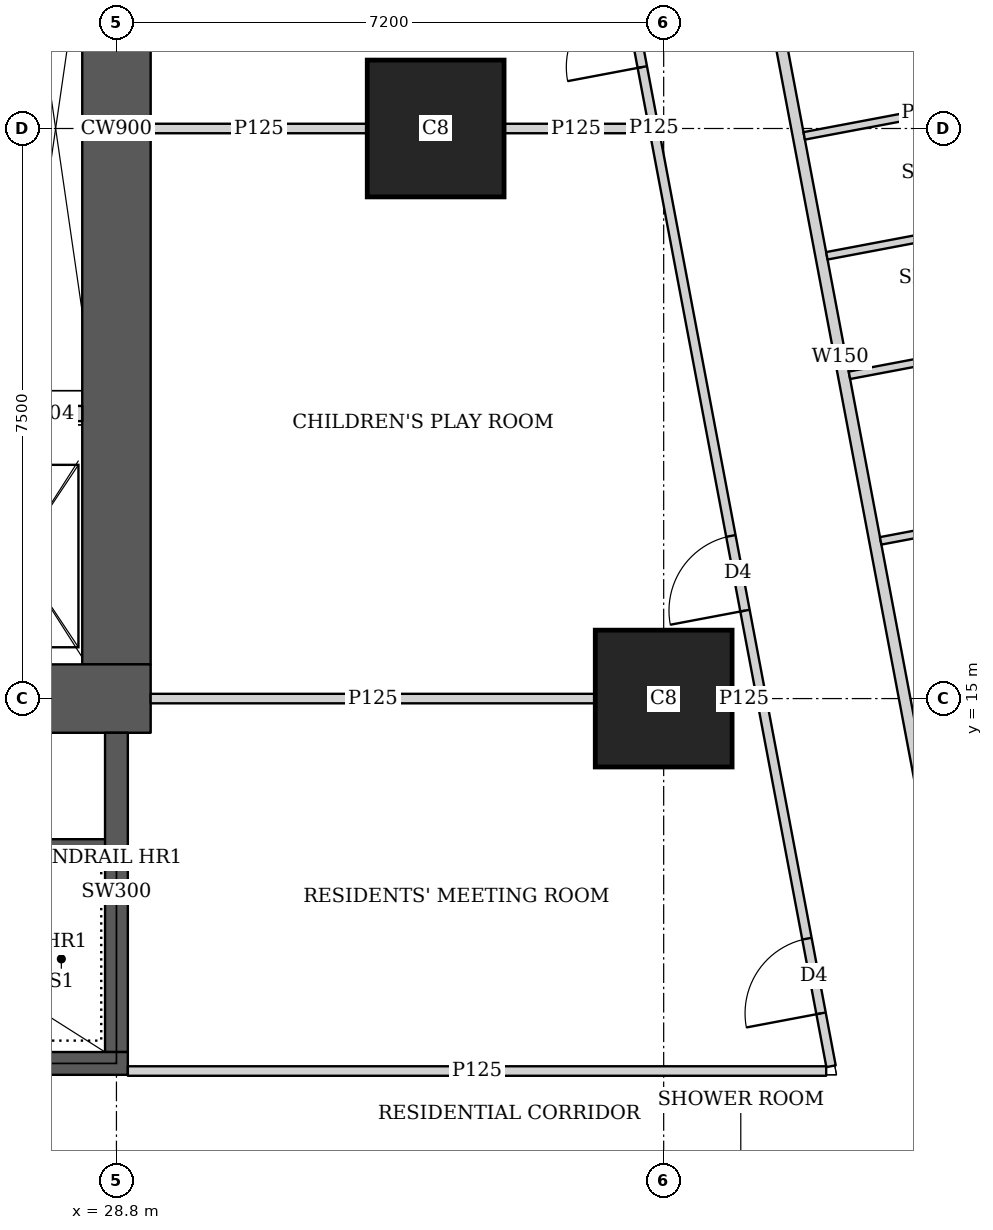
"""IFC4 building model, lengths in metres.
Left out: names, types, materials, properties, quantities, classifications, styles, units other than length and angle.
Written with IfcOpenShell. Run it as: python <this file> out.ifc"""

import sys

from ifc_helpers import new_model, si_unit, direction, frame, frame_2d, origin, origin_2d, place, context, subcontext, project, spatial, rectangle, extrude, element, fill, save


model = new_model("IFC4")
c1 = context("Model", 3, precision=1e-05, world=origin(), true_north=direction((0.0, 1.0)))
c2 = subcontext(c1, "Body", "Model", "MODEL_VIEW")
j1 = project(units=[si_unit("LENGTHUNIT", "METRE"), si_unit("PLANEANGLEUNIT", "RADIAN")], contexts=[c1])
p1 = place(None, origin())
s1 = spatial("IfcSite", under=j1, at=p1, CompositionType="ELEMENT")
p2 = place(p1, origin())
s2 = spatial("IfcBuilding", under=s1, at=p2, CompositionType="ELEMENT")
p3 = place(p2, frame((0.0, 0.0, 31.25)))
s3 = spatial("IfcBuildingStorey", under=s2, at=p3, CompositionType="ELEMENT", Elevation=31.25)
for number, where, z_axis, x_axis in (
    (1, (36.0, 15.0, 0.0), (0.0, 0.0, 1.0), (1.0, 0.0, 0.0)),
    (2, (33.0, 22.5, 0.0), (0.0, 0.0, 1.0), (1.0, 0.0, 0.0)),
):
    element("IfcColumn", number, at=place(p3, frame(where, z_axis=z_axis, x_axis=x_axis)), inside=s3, PredefinedType="COLUMN", context=c2, shape_type="SweptSolid", body=[
        extrude(rectangle(XDim=1.8, YDim=1.8, at=origin_2d()), origin(), (0.0, 0.0, 1.0), 3.75),
    ])
p4 = place(p3, frame((13.95, 15.0, 0.0), z_axis=(0.0, 0.0, 1.0), x_axis=(1.0, 0.0, 0.0)))
e3 = element("IfcWall", 3, at=p4, inside=s3, PredefinedType="SHEAR", context=c2, shape_type="SweptSolid", body=[
    extrude(rectangle(XDim=15.3, YDim=0.9, at=frame_2d((7.65, 0.0))), origin(), (0.0, 0.0, 1.0), 3.75),
])
p5 = place(p4, frame((4.45, 0.0, 0.0)))
e4 = element("IfcOpeningElement", 4, at=p5, cuts=e3, PredefinedType="OPENING", context=c2, shape_type="SweptSolid", body=[
    extrude(rectangle(XDim=1.8, YDim=2.1, at=frame_2d((0.9, 1.05))), frame((0.0, 0.46, 0.0), z_axis=(0.0, -1.0, 0.0), x_axis=(1.0, 0.0, 0.0)), (0.0, 0.0, 1.0), 0.92),
])
p6 = place(p4, frame((10.7, 0.0, 0.0)))
e5 = element("IfcOpeningElement", 5, at=p6, cuts=e3, PredefinedType="OPENING", context=c2, shape_type="SweptSolid", body=[
    extrude(rectangle(XDim=1.1, YDim=2.1, at=frame_2d((0.55, 1.05))), frame((0.0, 0.46, 0.0), z_axis=(0.0, -1.0, 0.0), x_axis=(1.0, 0.0, 0.0)), (0.0, 0.0, 1.0), 0.92),
])
p7 = place(p3, frame((28.8, 15.45, 0.0), z_axis=(0.0, 0.0, 1.0), x_axis=(0.0, 1.0, 0.0)))
e6 = element("IfcWall", 6, at=p7, inside=s3, PredefinedType="SHEAR", context=c2, shape_type="SweptSolid", body=[
    extrude(rectangle(XDim=14.1, YDim=0.9, at=frame_2d((7.05, 0.0))), origin(), (0.0, 0.0, 1.0), 3.75),
])
p8 = place(p3, frame((21.45, 10.2, 0.0), z_axis=(0.0, 0.0, 1.0), x_axis=(1.0, 0.0, 0.0)))
e7 = element("IfcWall", 7, at=p8, inside=s3, PredefinedType="SHEAR", context=c2, shape_type="SweptSolid", body=[
    extrude(rectangle(XDim=7.5, YDim=0.3, at=frame_2d((3.75, 0.0))), origin(), (0.0, 0.0, 1.0), 3.75),
])
p9 = place(p8, frame((0.5, 0.0, 0.0)))
e8 = element("IfcOpeningElement", 8, at=p9, cuts=e7, PredefinedType="OPENING", context=c2, shape_type="SweptSolid", body=[
    extrude(rectangle(XDim=1.1, YDim=2.1, at=frame_2d((0.55, 1.05))), frame((0.0, 0.16, 0.0), z_axis=(0.0, -1.0, 0.0), x_axis=(1.0, 0.0, 0.0)), (0.0, 0.0, 1.0), 0.32),
])
p10 = place(p3, frame((28.8, 10.35, 0.0), z_axis=(0.0, 0.0, 1.0), x_axis=(0.0, 1.0, 0.0)))
e9 = element("IfcWall", 9, at=p10, inside=s3, PredefinedType="SHEAR", context=c2, shape_type="SweptSolid", body=[
    extrude(rectangle(XDim=4.2, YDim=0.3, at=frame_2d((2.1, 0.0))), origin(), (0.0, 0.0, 1.0), 3.75),
])
p11 = place(p3, frame((35.094, 36.585, 0.0), z_axis=(0.0, 0.0, 1.0), x_axis=(0.185588860311, -0.982627485331, 0.0)))
e10 = element("IfcWall", 10, at=p11, inside=s3, PredefinedType="SOLIDWALL", context=c2, shape_type="SweptSolid", body=[
    extrude(rectangle(XDim=34.797, YDim=0.15, at=frame_2d((17.399, 0.0))), origin(), (0.0, 0.0, 1.0), 2.5),
])
p12 = place(p11, frame((6.012, 0.0, 0.0)))
e11 = element("IfcOpeningElement", 11, at=p12, cuts=e10, PredefinedType="OPENING", context=c2, shape_type="SweptSolid", body=[
    extrude(rectangle(XDim=1.0, YDim=2.1, at=frame_2d((0.5, 1.05))), frame((0.0, 0.085, 0.0), z_axis=(0.0, -1.0, 0.0), x_axis=(1.0, 0.0, 0.0)), (0.0, 0.0, 1.0), 0.17),
])
p13 = place(p11, frame((9.828, 0.0, 0.0)))
e12 = element("IfcOpeningElement", 12, at=p13, cuts=e10, PredefinedType="OPENING", context=c2, shape_type="SweptSolid", body=[
    extrude(rectangle(XDim=1.0, YDim=2.1, at=frame_2d((0.5, 1.05))), frame((0.0, 0.085, 0.0), z_axis=(0.0, -1.0, 0.0), x_axis=(1.0, 0.0, 0.0)), (0.0, 0.0, 1.0), 0.17),
])
p14 = place(p11, frame((25.9, 0.0, 0.0)))
e13 = element("IfcOpeningElement", 13, at=p14, cuts=e10, PredefinedType="OPENING", context=c2, shape_type="SweptSolid", body=[
    extrude(rectangle(XDim=1.0, YDim=2.1, at=frame_2d((0.5, 1.05))), frame((0.0, 0.085, 0.0), z_axis=(0.0, -1.0, 0.0), x_axis=(1.0, 0.0, 0.0)), (0.0, 0.0, 1.0), 0.17),
])
for number, where, z_axis, x_axis in (
    (14, (41.365, 21.433, 0.0), (0.0, 0.0, 1.0), (-0.983, -0.186, 0.0)),
    (15, (42.073, 17.683, 0.0), (0.0, 0.0, 1.0), (-0.983, -0.186, 0.0)),
):
    element("IfcWall", number, at=place(p3, frame(where, z_axis=z_axis, x_axis=x_axis)), inside=s3, PredefinedType="PARTITIONING", context=c2, shape_type="SweptSolid", body=[
        extrude(rectangle(XDim=3.275, YDim=0.1, at=frame_2d((1.637, 0.0))), origin(), (0.0, 0.0, 1.0), 3.5),
    ])
p15 = place(p3, frame((41.067, 23.011, 0.0), z_axis=(0.0, 0.0, 1.0), x_axis=(-0.982618057925, -0.185638768151, 0.0)))
e16 = element("IfcWall", 16, at=p15, inside=s3, PredefinedType="PARTITIONING", context=c2, shape_type="SweptSolid", body=[
    extrude(rectangle(XDim=3.275, YDim=0.1, at=frame_2d((1.637, 0.0))), origin(), (0.0, 0.0, 1.0), 2.5),
])
p16 = place(p3, frame((41.662, 19.861, 0.0), z_axis=(0.0, 0.0, 1.0), x_axis=(-0.982607026909, -0.185697147715, 0.0)))
e17 = element("IfcWall", 17, at=p16, inside=s3, PredefinedType="PARTITIONING", context=c2, shape_type="SweptSolid", body=[
    extrude(rectangle(XDim=3.275, YDim=0.1, at=frame_2d((1.637, 0.0))), origin(), (0.0, 0.0, 1.0), 3.5),
])
p17 = place(p3, frame((28.95, 10.1, 0.0), z_axis=(0.0, 0.0, 1.0), x_axis=(1.0, 0.0, 0.0)))
e18 = element("IfcWall", 18, at=p17, inside=s3, PredefinedType="PARTITIONING", context=c2, shape_type="SweptSolid", body=[
    extrude(rectangle(XDim=9.188, YDim=0.125, at=frame_2d((4.594, 0.0))), origin(), (0.0, 0.0, 1.0), 3.5),
])
p18 = place(p3, frame((38.202, 10.163, 0.0), z_axis=(0.0, 0.0, 1.0), x_axis=(-0.185610321132, 0.982623431783, 0.0)))
e19 = element("IfcWall", 19, at=p18, inside=s3, PredefinedType="PARTITIONING", context=c2, shape_type="SweptSolid", body=[
    extrude(rectangle(XDim=25.111, YDim=0.125, at=frame_2d((12.556, 0.0))), origin(), (0.0, 0.0, 1.0), 2.5),
])
p19 = place(p18, frame((0.708, 0.0, 0.0)))
e20 = element("IfcOpeningElement", 20, at=p19, cuts=e19, PredefinedType="OPENING", context=c2, shape_type="SweptSolid", body=[
    extrude(rectangle(XDim=1.0, YDim=2.1, at=frame_2d((0.5, 1.05))), frame((0.0, 0.073, 0.0), z_axis=(0.0, -1.0, 0.0), x_axis=(1.0, 0.0, 0.0)), (0.0, 0.0, 1.0), 0.145),
])
p20 = place(p18, frame((6.1, 0.0, 0.0)))
e21 = element("IfcOpeningElement", 21, at=p20, cuts=e19, PredefinedType="OPENING", context=c2, shape_type="SweptSolid", body=[
    extrude(rectangle(XDim=1.0, YDim=2.1, at=frame_2d((0.5, 1.05))), frame((0.0, 0.073, 0.0), z_axis=(0.0, -1.0, 0.0), x_axis=(1.0, 0.0, 0.0)), (0.0, 0.0, 1.0), 0.145),
])
p21 = place(p18, frame((13.378, 0.0, 0.0)))
e22 = element("IfcOpeningElement", 22, at=p21, cuts=e19, PredefinedType="OPENING", context=c2, shape_type="SweptSolid", body=[
    extrude(rectangle(XDim=1.0, YDim=2.1, at=frame_2d((0.5, 1.05))), frame((0.0, 0.073, 0.0), z_axis=(0.0, -1.0, 0.0), x_axis=(1.0, 0.0, 0.0)), (0.0, 0.0, 1.0), 0.145),
])
p22 = place(p18, frame((17.194, 0.0, 0.0)))
e23 = element("IfcOpeningElement", 23, at=p22, cuts=e19, PredefinedType="OPENING", context=c2, shape_type="SweptSolid", body=[
    extrude(rectangle(XDim=1.0, YDim=2.1, at=frame_2d((0.5, 1.05))), frame((0.0, 0.073, 0.0), z_axis=(0.0, -1.0, 0.0), x_axis=(1.0, 0.0, 0.0)), (0.0, 0.0, 1.0), 0.145),
])
p23 = place(p18, frame((21.35, 0.0, 0.0)))
e24 = element("IfcOpeningElement", 24, at=p23, cuts=e19, PredefinedType="OPENING", context=c2, shape_type="SweptSolid", body=[
    extrude(rectangle(XDim=1.0, YDim=2.1, at=frame_2d((0.5, 1.05))), frame((0.0, 0.073, 0.0), z_axis=(0.0, -1.0, 0.0), x_axis=(1.0, 0.0, 0.0)), (0.0, 0.0, 1.0), 0.145),
])
p24 = place(p3, frame((29.25, 15.0, 0.0), z_axis=(0.0, 0.0, 1.0), x_axis=(1.0, 0.0, 0.0)))
e25 = element("IfcWall", 25, at=p24, inside=s3, PredefinedType="PARTITIONING", context=c2, shape_type="SweptSolid", body=[
    extrude(rectangle(XDim=5.849, YDim=0.125, at=frame_2d((2.925, 0.0))), origin(), (0.0, 0.0, 1.0), 3.5),
])
p25 = place(p3, frame((36.901, 15.0, 0.0), z_axis=(0.0, 0.0, 1.0), x_axis=(1.0, 0.0, 0.0)))
e26 = element("IfcWall", 26, at=p25, inside=s3, PredefinedType="PARTITIONING", context=c2, shape_type="SweptSolid", body=[
    extrude(rectangle(XDim=0.312, YDim=0.125, at=frame_2d((0.156, 0.0))), origin(), (0.0, 0.0, 1.0), 3.5),
])
p26 = place(p3, frame((29.25, 22.5, 0.0), z_axis=(0.0, 0.0, 1.0), x_axis=(1.0, 0.0, 0.0)))
e27 = element("IfcWall", 27, at=p26, inside=s3, PredefinedType="PARTITIONING", context=c2, shape_type="SweptSolid", body=[
    extrude(rectangle(XDim=2.849, YDim=0.125, at=frame_2d((1.425, 0.0))), origin(), (0.0, 0.0, 1.0), 3.5),
])
p27 = place(p3, frame((33.901, 22.5, 0.0), z_axis=(0.0, 0.0, 1.0), x_axis=(1.0, 0.0, 0.0)))
e28 = element("IfcWall", 28, at=p27, inside=s3, PredefinedType="PARTITIONING", context=c2, shape_type="SweptSolid", body=[
    extrude(rectangle(XDim=1.895, YDim=0.125, at=frame_2d((0.948, 0.0))), origin(), (0.0, 0.0, 1.0), 2.5),
])
p28 = place(p3, frame((23.0, 13.05, 0.0), z_axis=(0.0, 0.0, 1.0), x_axis=(1.0, 0.0, 0.0)))
e29 = element("IfcWall", 29, at=p28, inside=s3, PredefinedType="SHEAR", context=c2, shape_type="SweptSolid", body=[
    extrude(rectangle(XDim=5.8, YDim=0.2, at=frame_2d((2.9, 0.0))), origin(), (0.0, 0.0, 1.0), 3.75),
])
p29 = place(p3, frame((27.4, 18.75, 0.0), z_axis=(0.0, 0.0, 1.0), x_axis=(1.0, 0.0, 0.0)))
e30 = element("IfcWall", 30, at=p29, inside=s3, PredefinedType="SOLIDWALL", context=c2, shape_type="SweptSolid", body=[
    extrude(rectangle(XDim=0.95, YDim=0.2, at=frame_2d((0.475, 0.0))), origin(), (0.0, 0.0, 1.0), 3.5),
])
p30 = place(p19, origin())
e31 = element("IfcDoor", 31, at=p30, inside=s3, OperationType="SINGLE_SWING_LEFT", PredefinedType="DOOR", context=c2, shape_type="SweptSolid", body=[
    extrude(rectangle(XDim=1.0, YDim=2.1, at=frame_2d((0.5, 1.05))), frame((0.0, 0.025, 0.0), z_axis=(0.0, -1.0, 0.0), x_axis=(1.0, 0.0, 0.0)), (0.0, 0.0, 1.0), 0.05),
])
fill(e20, e31)
p31 = place(p20, origin())
e32 = element("IfcDoor", 32, at=p31, inside=s3, OperationType="SINGLE_SWING_LEFT", PredefinedType="DOOR", context=c2, shape_type="SweptSolid", body=[
    extrude(rectangle(XDim=1.0, YDim=2.1, at=frame_2d((0.5, 1.05))), frame((0.0, 0.025, 0.0), z_axis=(0.0, -1.0, 0.0), x_axis=(1.0, 0.0, 0.0)), (0.0, 0.0, 1.0), 0.05),
])
fill(e21, e32)
p32 = place(p21, origin())
e33 = element("IfcDoor", 33, at=p32, inside=s3, OperationType="SINGLE_SWING_LEFT", PredefinedType="DOOR", context=c2, shape_type="SweptSolid", body=[
    extrude(rectangle(XDim=1.0, YDim=2.1, at=frame_2d((0.5, 1.05))), frame((0.0, 0.025, 0.0), z_axis=(0.0, -1.0, 0.0), x_axis=(1.0, 0.0, 0.0)), (0.0, 0.0, 1.0), 0.05),
])
fill(e22, e33)
save(model, sys.argv[1])
